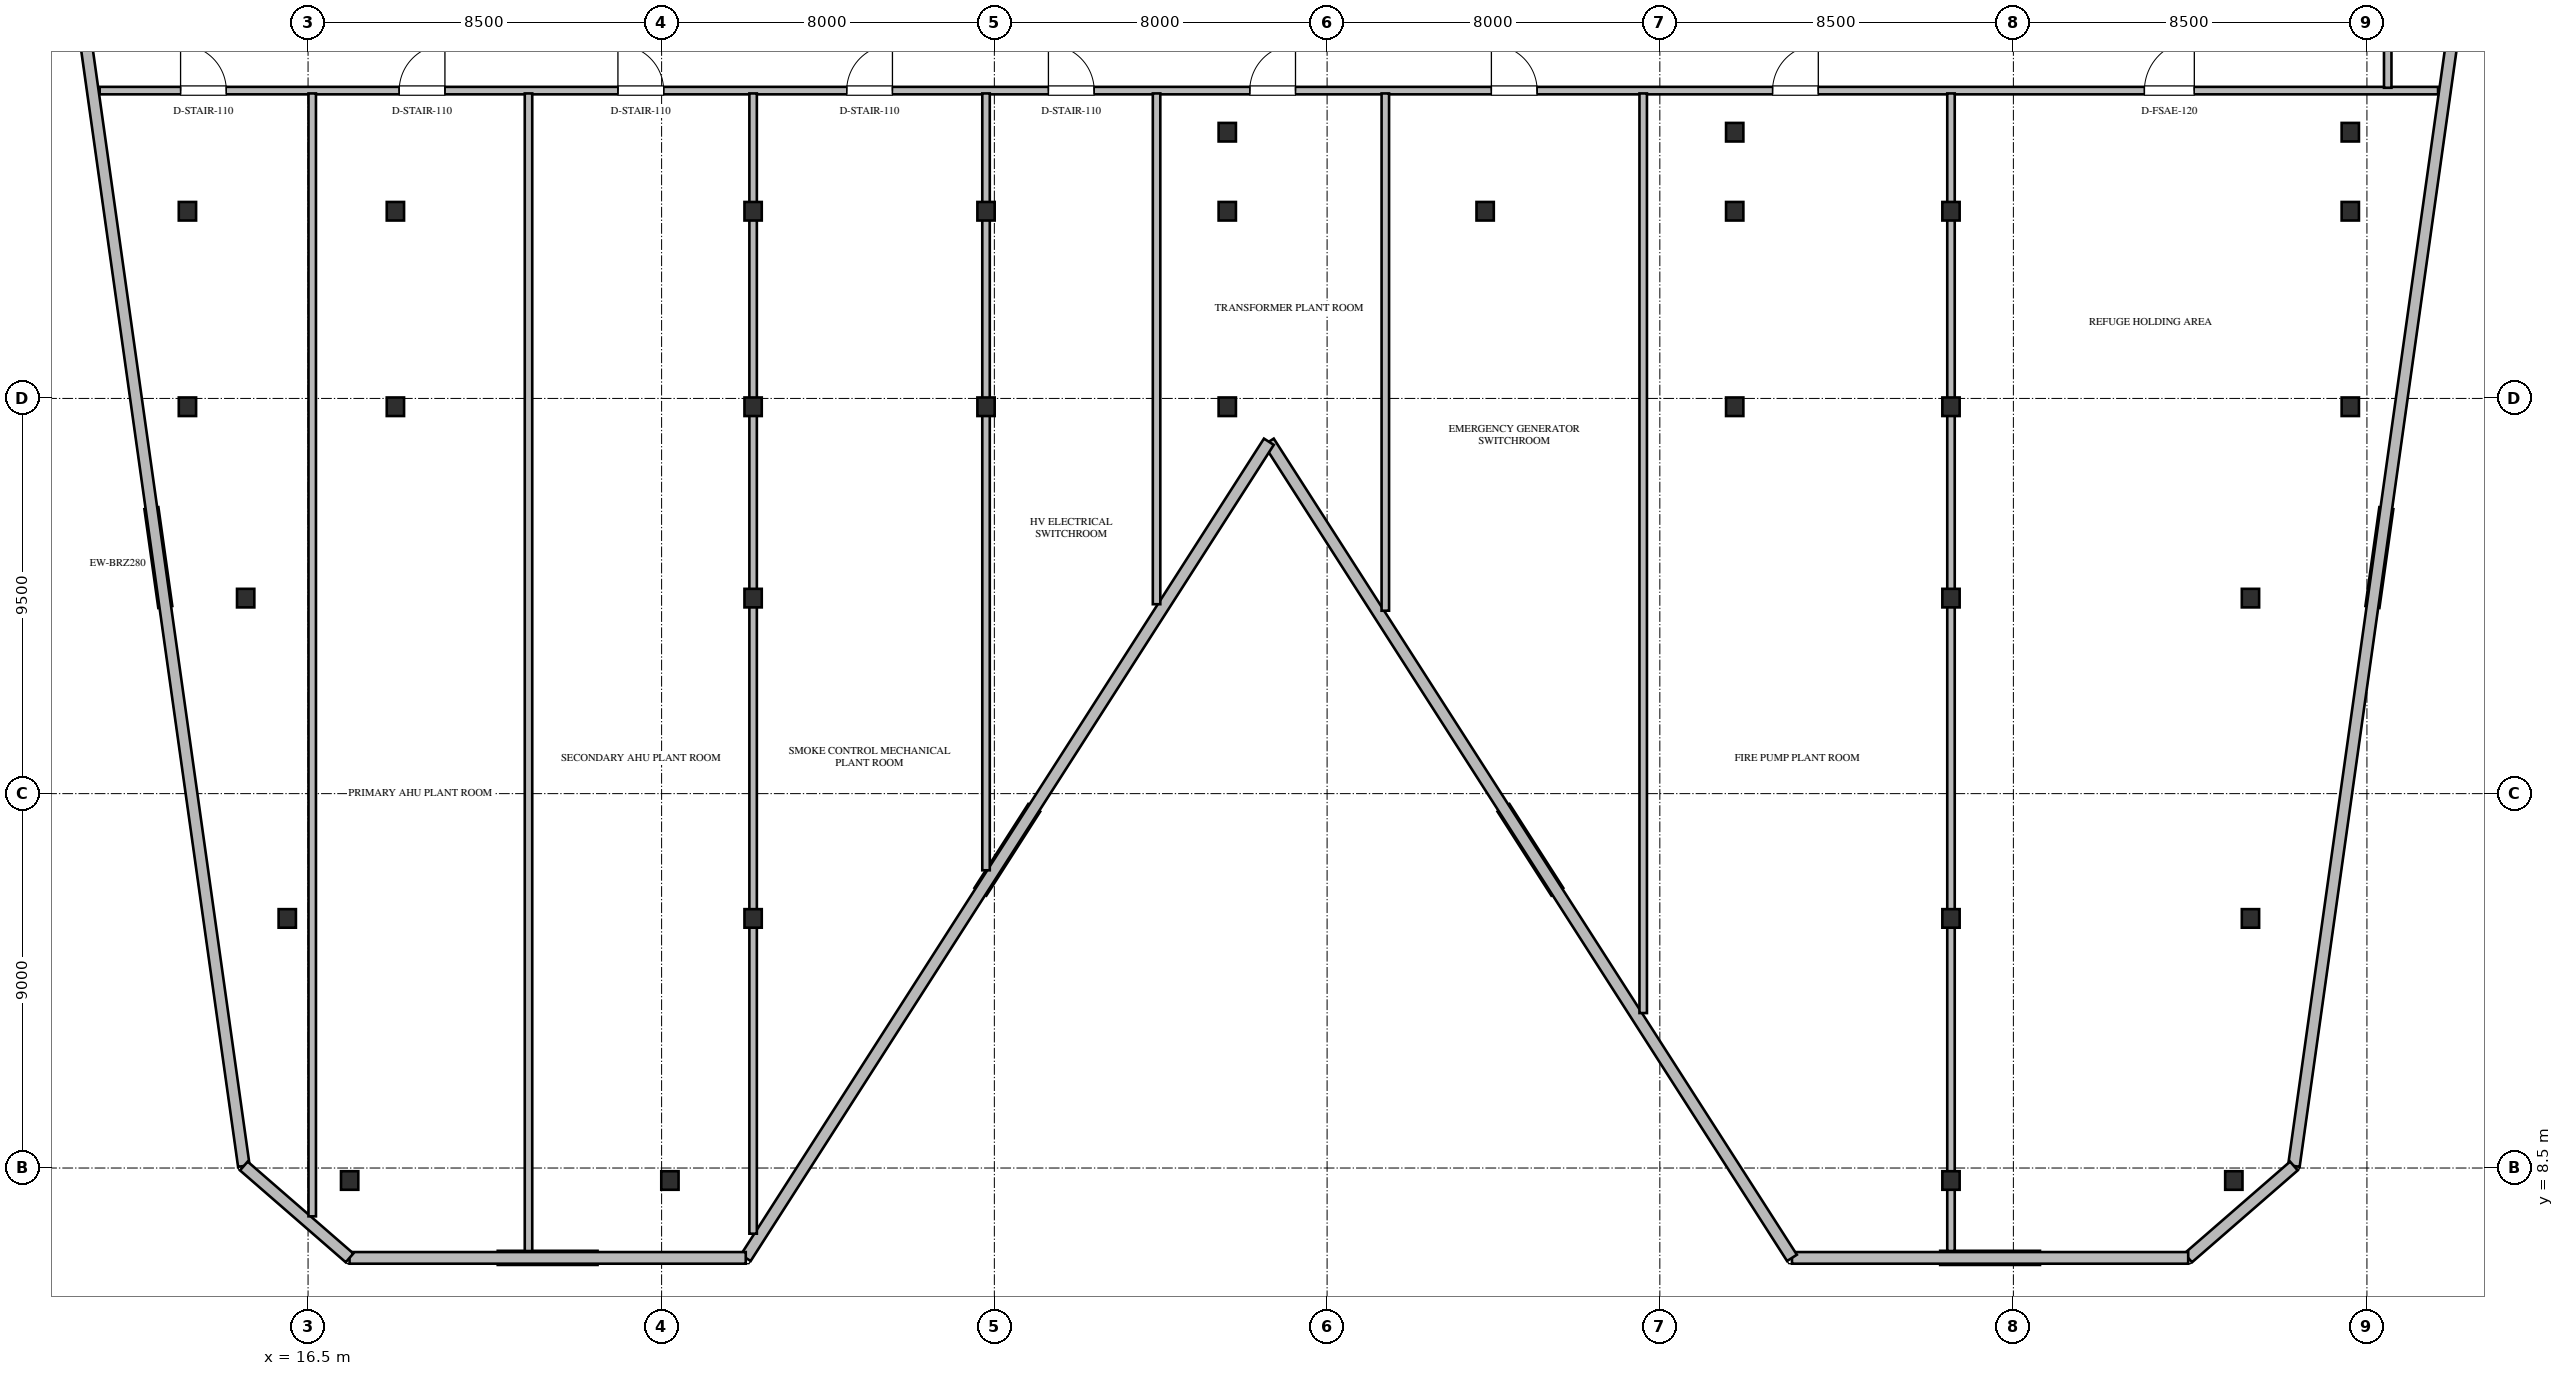
"""IFC4 building model, lengths in metres.
Left out: names, types, materials, properties, quantities, classifications, styles, units other than length and angle.
Written with IfcOpenShell. Run it as: python <this file> out.ifc"""

import sys

from ifc_helpers import new_model, si_unit, direction, frame, frame_2d, origin, origin_2d, place, context, subcontext, project, spatial, rectangle, i_section, extrude, element, fill, save


model = new_model("IFC4")
c1 = context("Model", 3, precision=1e-05, world=origin(), true_north=direction((0.0, 1.0)))
c2 = subcontext(c1, "Body", "Model", "MODEL_VIEW")
j1 = project(units=[si_unit("LENGTHUNIT", "METRE"), si_unit("PLANEANGLEUNIT", "RADIAN")], contexts=[c1])
p1 = place(None, origin())
s1 = spatial("IfcSite", under=j1, at=p1, CompositionType="ELEMENT")
p2 = place(p1, origin())
s2 = spatial("IfcBuilding", under=s1, at=p2, CompositionType="ELEMENT")
p3 = place(p2, frame((0.0, 0.0, 156.0)))
s3 = spatial("IfcBuildingStorey", under=s2, at=p3, CompositionType="ELEMENT", Elevation=156.0)
for number, where, z_axis, x_axis in (
    (1, (17.5, 8.2, 0.0), (0.0, 0.0, 1.0), (1.0, 0.0, 0.0)),
    (2, (13.6, 26.8, 0.0), (0.0, 0.0, 1.0), (1.0, 0.0, 0.0)),
    (3, (18.6, 26.8, 0.0), (0.0, 0.0, 1.0), (1.0, 0.0, 0.0)),
    (4, (27.2, 26.8, 0.0), (0.0, 0.0, 1.0), (1.0, 0.0, 0.0)),
    (5, (32.8, 26.8, 0.0), (0.0, 0.0, 1.0), (1.0, 0.0, 0.0)),
    (6, (38.6, 26.8, 0.0), (0.0, 0.0, 1.0), (1.0, 0.0, 0.0)),
    (7, (50.8, 26.8, 0.0), (0.0, 0.0, 1.0), (1.0, 0.0, 0.0)),
    (8, (56.0, 26.8, 0.0), (0.0, 0.0, 1.0), (1.0, 0.0, 0.0)),
    (9, (65.6, 26.8, 0.0), (0.0, 0.0, 1.0), (1.0, 0.0, 0.0)),
    (10, (13.6, 31.5, 0.0), (0.0, 0.0, 1.0), (1.0, 0.0, 0.0)),
    (11, (18.6, 31.5, 0.0), (0.0, 0.0, 1.0), (1.0, 0.0, 0.0)),
    (12, (27.2, 31.5, 0.0), (0.0, 0.0, 1.0), (1.0, 0.0, 0.0)),
    (13, (25.2, 8.2, 0.0), (0.0, 0.0, 1.0), (1.0, 0.0, 0.0)),
    (14, (32.8, 31.5, 0.0), (0.0, 0.0, 1.0), (1.0, 0.0, 0.0)),
    (15, (38.6, 31.5, 0.0), (0.0, 0.0, 1.0), (1.0, 0.0, 0.0)),
    (16, (44.8, 31.5, 0.0), (0.0, 0.0, 1.0), (1.0, 0.0, 0.0)),
    (17, (50.8, 31.5, 0.0), (0.0, 0.0, 1.0), (1.0, 0.0, 0.0)),
    (18, (56.0, 31.5, 0.0), (0.0, 0.0, 1.0), (1.0, 0.0, 0.0)),
    (19, (65.6, 31.5, 0.0), (0.0, 0.0, 1.0), (1.0, 0.0, 0.0)),
    (20, (56.0, 8.2, 0.0), (0.0, 0.0, 1.0), (1.0, 0.0, 0.0)),
    (21, (62.8, 8.2, 0.0), (0.0, 0.0, 1.0), (1.0, 0.0, 0.0)),
    (22, (16.0, 14.5, 0.0), (0.0, 0.0, 1.0), (1.0, 0.0, 0.0)),
    (23, (27.2, 14.5, 0.0), (0.0, 0.0, 1.0), (1.0, 0.0, 0.0)),
    (24, (56.0, 14.5, 0.0), (0.0, 0.0, 1.0), (1.0, 0.0, 0.0)),
    (25, (63.2, 14.5, 0.0), (0.0, 0.0, 1.0), (1.0, 0.0, 0.0)),
    (26, (15.0, 22.2, 0.0), (0.0, 0.0, 1.0), (1.0, 0.0, 0.0)),
    (27, (27.2, 22.2, 0.0), (0.0, 0.0, 1.0), (1.0, 0.0, 0.0)),
    (28, (56.0, 22.2, 0.0), (0.0, 0.0, 1.0), (1.0, 0.0, 0.0)),
    (29, (63.2, 22.2, 0.0), (0.0, 0.0, 1.0), (1.0, 0.0, 0.0)),
    (30, (38.6, 33.4, 0.0), (0.0, 0.0, 1.0), (1.0, 0.0, 0.0)),
    (31, (50.8, 33.4, 0.0), (0.0, 0.0, 1.0), (1.0, 0.0, 0.0)),
    (32, (65.6, 33.4, 0.0), (0.0, 0.0, 1.0), (1.0, 0.0, 0.0)),
):
    element("IfcColumn", number, at=place(p3, frame(where, z_axis=z_axis, x_axis=x_axis)), inside=s3, PredefinedType="COLUMN", context=c2, shape_type="SweptSolid", body=[
        extrude(i_section(OverallWidth=0.416, OverallDepth=0.446, WebThickness=0.039, FlangeThickness=0.063, FilletRadius=0.03, at=origin_2d()), origin(), (0.0, 0.0, 1.0), 4.5),
    ])
p4 = place(p3, frame((14.956, 8.549, 0.0), z_axis=(0.0, 0.0, 1.0), x_axis=(-0.139176188744, 0.990267634777, 0.0)))
e33 = element("IfcWall", 33, at=p4, inside=s3, PredefinedType="STANDARD", context=c2, shape_type="SweptSolid", body=[
    extrude(rectangle(XDim=29.539, YDim=0.28, at=frame_2d((14.77, 0.0))), origin(), (0.0, 0.0, 1.0), 4.25),
])
p5 = place(p3, frame((68.355, 37.8, 0.0), z_axis=(0.0, 0.0, 1.0), x_axis=(-0.139168083715, -0.990268773856, 0.0)))
e34 = element("IfcWall", 34, at=p5, inside=s3, PredefinedType="STANDARD", context=c2, shape_type="SweptSolid", body=[
    extrude(rectangle(XDim=29.539, YDim=0.28, at=frame_2d((14.769, 0.0))), origin(), (0.0, 0.0, 1.0), 4.25),
])
p6 = place(p3, frame((64.244, 8.549, 0.0), z_axis=(0.0, 0.0, 1.0), x_axis=(-0.754728837785, -0.656036875042, 0.0)))
e35 = element("IfcWall", 35, at=p6, inside=s3, PredefinedType="STANDARD", context=c2, shape_type="SweptSolid", body=[
    extrude(rectangle(XDim=3.367, YDim=0.28, at=frame_2d((1.683, 0.0))), origin(), (0.0, 0.0, 1.0), 4.25),
])
p7 = place(p3, frame((61.703, 6.34, 0.0), z_axis=(0.0, 0.0, 1.0), x_axis=(-1.0, 0.0, 0.0)))
e36 = element("IfcWall", 36, at=p7, inside=s3, PredefinedType="STANDARD", context=c2, shape_type="SweptSolid", body=[
    extrude(rectangle(XDim=9.526, YDim=0.28, at=frame_2d((4.763, 0.0))), origin(), (0.0, 0.0, 1.0), 4.25),
])
p8 = place(p3, frame((52.177, 6.34, 0.0), z_axis=(0.0, 0.0, 1.0), x_axis=(-0.539662687725, 0.841881335746, 0.0)))
e37 = element("IfcWall", 37, at=p8, inside=s3, PredefinedType="STANDARD", context=c2, shape_type="SweptSolid", body=[
    extrude(rectangle(XDim=23.304, YDim=0.28, at=frame_2d((11.652, 0.0))), origin(), (0.0, 0.0, 1.0), 4.25),
])
p9 = place(p3, frame((39.6, 25.959, 0.0), z_axis=(0.0, 0.0, 1.0), x_axis=(-0.539670112848, -0.841876576048, 0.0)))
e38 = element("IfcWall", 38, at=p9, inside=s3, PredefinedType="STANDARD", context=c2, shape_type="SweptSolid", body=[
    extrude(rectangle(XDim=23.304, YDim=0.28, at=frame_2d((11.652, 0.0))), origin(), (0.0, 0.0, 1.0), 4.25),
])
p10 = place(p3, frame((27.023, 6.34, 0.0), z_axis=(0.0, 0.0, 1.0), x_axis=(-1.0, 0.0, 0.0)))
e39 = element("IfcWall", 39, at=p10, inside=s3, PredefinedType="STANDARD", context=c2, shape_type="SweptSolid", body=[
    extrude(rectangle(XDim=9.526, YDim=0.28, at=frame_2d((4.763, 0.0))), origin(), (0.0, 0.0, 1.0), 4.25),
])
p11 = place(p3, frame((17.497, 6.34, 0.0), z_axis=(0.0, 0.0, 1.0), x_axis=(-0.754728837785, 0.656036875042, 0.0)))
e40 = element("IfcWall", 40, at=p11, inside=s3, PredefinedType="STANDARD", context=c2, shape_type="SweptSolid", body=[
    extrude(rectangle(XDim=3.367, YDim=0.28, at=frame_2d((1.683, 0.0))), origin(), (0.0, 0.0, 1.0), 4.25),
])
p12 = place(p3, frame((11.49, 34.4, 0.0), z_axis=(0.0, 0.0, 1.0), x_axis=(1.0, 0.0, 0.0)))
e41 = element("IfcWall", 41, at=p12, inside=s3, PredefinedType="STANDARD", context=c2, shape_type="SweptSolid", body=[
    extrude(rectangle(XDim=56.22, YDim=0.18, at=frame_2d((28.11, 0.0))), origin(), (0.0, 0.0, 1.0), 3.394),
])
p13 = place(p12, frame((49.16, 0.0, 0.0)))
e42 = element("IfcOpeningElement", 42, at=p13, cuts=e41, PredefinedType="OPENING", context=c2, shape_type="SweptSolid", body=[
    extrude(rectangle(XDim=1.2, YDim=2.2, at=frame_2d((0.6, 1.1))), frame((0.0, 0.1, 0.0), z_axis=(0.0, -1.0, 0.0), x_axis=(1.0, 0.0, 0.0)), (0.0, 0.0, 1.0), 0.2),
])
p14 = place(p12, frame((1.945, 0.0, 0.0)))
e43 = element("IfcOpeningElement", 43, at=p14, cuts=e41, PredefinedType="OPENING", context=c2, shape_type="SweptSolid", body=[
    extrude(rectangle(XDim=1.1, YDim=2.2, at=frame_2d((0.55, 1.1))), frame((0.0, 0.1, 0.0), z_axis=(0.0, -1.0, 0.0), x_axis=(1.0, 0.0, 0.0)), (0.0, 0.0, 1.0), 0.2),
])
p15 = place(p12, frame((7.201, 0.0, 0.0)))
e44 = element("IfcOpeningElement", 44, at=p15, cuts=e41, PredefinedType="OPENING", context=c2, shape_type="SweptSolid", body=[
    extrude(rectangle(XDim=1.1, YDim=2.2, at=frame_2d((0.55, 1.1))), frame((0.0, 0.1, 0.0), z_axis=(0.0, -1.0, 0.0), x_axis=(1.0, 0.0, 0.0)), (0.0, 0.0, 1.0), 0.2),
])
p16 = place(p12, frame((12.46, 0.0, 0.0)))
e45 = element("IfcOpeningElement", 45, at=p16, cuts=e41, PredefinedType="OPENING", context=c2, shape_type="SweptSolid", body=[
    extrude(rectangle(XDim=1.1, YDim=2.2, at=frame_2d((0.55, 1.1))), frame((0.0, 0.1, 0.0), z_axis=(0.0, -1.0, 0.0), x_axis=(1.0, 0.0, 0.0)), (0.0, 0.0, 1.0), 0.2),
])
p17 = place(p12, frame((17.96, 0.0, 0.0)))
e46 = element("IfcOpeningElement", 46, at=p17, cuts=e41, PredefinedType="OPENING", context=c2, shape_type="SweptSolid", body=[
    extrude(rectangle(XDim=1.1, YDim=2.2, at=frame_2d((0.55, 1.1))), frame((0.0, 0.1, 0.0), z_axis=(0.0, -1.0, 0.0), x_axis=(1.0, 0.0, 0.0)), (0.0, 0.0, 1.0), 0.2),
])
p18 = place(p12, frame((22.81, 0.0, 0.0)))
e47 = element("IfcOpeningElement", 47, at=p18, cuts=e41, PredefinedType="OPENING", context=c2, shape_type="SweptSolid", body=[
    extrude(rectangle(XDim=1.1, YDim=2.2, at=frame_2d((0.55, 1.1))), frame((0.0, 0.1, 0.0), z_axis=(0.0, -1.0, 0.0), x_axis=(1.0, 0.0, 0.0)), (0.0, 0.0, 1.0), 0.2),
])
p19 = place(p12, frame((27.651, 0.0, 0.0)))
e48 = element("IfcOpeningElement", 48, at=p19, cuts=e41, PredefinedType="OPENING", context=c2, shape_type="SweptSolid", body=[
    extrude(rectangle(XDim=1.1, YDim=2.2, at=frame_2d((0.55, 1.1))), frame((0.0, 0.1, 0.0), z_axis=(0.0, -1.0, 0.0), x_axis=(1.0, 0.0, 0.0)), (0.0, 0.0, 1.0), 0.2),
])
p20 = place(p12, frame((33.46, 0.0, 0.0)))
e49 = element("IfcOpeningElement", 49, at=p20, cuts=e41, PredefinedType="OPENING", context=c2, shape_type="SweptSolid", body=[
    extrude(rectangle(XDim=1.1, YDim=2.2, at=frame_2d((0.55, 1.1))), frame((0.0, 0.1, 0.0), z_axis=(0.0, -1.0, 0.0), x_axis=(1.0, 0.0, 0.0)), (0.0, 0.0, 1.0), 0.2),
])
p21 = place(p12, frame((40.22, 0.0, 0.0)))
e50 = element("IfcOpeningElement", 50, at=p21, cuts=e41, PredefinedType="OPENING", context=c2, shape_type="SweptSolid", body=[
    extrude(rectangle(XDim=1.1, YDim=2.2, at=frame_2d((0.55, 1.1))), frame((0.0, 0.1, 0.0), z_axis=(0.0, -1.0, 0.0), x_axis=(1.0, 0.0, 0.0)), (0.0, 0.0, 1.0), 0.2),
])
p22 = place(p3, frame((66.5, 34.468, 0.0), z_axis=(0.0, 0.0, 1.0), x_axis=(0.0, 1.0, 0.0)))
e51 = element("IfcWall", 51, at=p22, inside=s3, PredefinedType="STANDARD", context=c2, shape_type="SweptSolid", body=[
    extrude(rectangle(XDim=3.199, YDim=0.18, at=frame_2d((1.6, 0.0))), origin(), (0.0, 0.0, 1.0), 3.394),
])
p23 = place(p3, frame((56.0, 6.505, 0.0), z_axis=(0.0, 0.0, 1.0), x_axis=(0.0, 1.0, 0.0)))
e52 = element("IfcWall", 52, at=p23, inside=s3, PredefinedType="STANDARD", context=c2, shape_type="SweptSolid", body=[
    extrude(rectangle(XDim=27.827, YDim=0.18, at=frame_2d((13.914, 0.0))), origin(), (0.0, 0.0, 1.0), 3.239),
])
p24 = place(p3, frame((16.6, 7.339, 0.0), z_axis=(0.0, 0.0, 1.0), x_axis=(0.0, 1.0, 0.0)))
e53 = element("IfcWall", 53, at=p24, inside=s3, PredefinedType="STANDARD", context=c2, shape_type="SweptSolid", body=[
    extrude(rectangle(XDim=26.993, YDim=0.18, at=frame_2d((13.497, 0.0))), origin(), (0.0, 0.0, 1.0), 2.45),
])
p25 = place(p3, frame((21.8, 6.505, 0.0), z_axis=(0.0, 0.0, 1.0), x_axis=(0.0, 1.0, 0.0)))
e54 = element("IfcWall", 54, at=p25, inside=s3, PredefinedType="STANDARD", context=c2, shape_type="SweptSolid", body=[
    extrude(rectangle(XDim=27.827, YDim=0.18, at=frame_2d((13.914, 0.0))), origin(), (0.0, 0.0, 1.0), 2.45),
])
p26 = place(p3, frame((27.2, 6.921, 0.0), z_axis=(0.0, 0.0, 1.0), x_axis=(0.0, 1.0, 0.0)))
e55 = element("IfcWall", 55, at=p26, inside=s3, PredefinedType="STANDARD", context=c2, shape_type="SweptSolid", body=[
    extrude(rectangle(XDim=27.411, YDim=0.18, at=frame_2d((13.706, 0.0))), origin(), (0.0, 0.0, 1.0), 2.45),
])
p27 = place(p3, frame((32.8, 15.657, 0.0), z_axis=(0.0, 0.0, 1.0), x_axis=(0.0, 1.0, 0.0)))
e56 = element("IfcWall", 56, at=p27, inside=s3, PredefinedType="STANDARD", context=c2, shape_type="SweptSolid", body=[
    extrude(rectangle(XDim=18.675, YDim=0.18, at=frame_2d((9.337, 0.0))), origin(), (0.0, 0.0, 1.0), 3.209),
])
p28 = place(p3, frame((36.9, 22.053, 0.0), z_axis=(0.0, 0.0, 1.0), x_axis=(0.0, 1.0, 0.0)))
e57 = element("IfcWall", 57, at=p28, inside=s3, PredefinedType="STANDARD", context=c2, shape_type="SweptSolid", body=[
    extrude(rectangle(XDim=12.279, YDim=0.18, at=frame_2d((6.139, 0.0))), origin(), (0.0, 0.0, 1.0), 3.209),
])
p29 = place(p3, frame((42.4, 21.897, 0.0), z_axis=(0.0, 0.0, 1.0), x_axis=(0.0, 1.0, 0.0)))
e58 = element("IfcWall", 58, at=p29, inside=s3, PredefinedType="STANDARD", context=c2, shape_type="SweptSolid", body=[
    extrude(rectangle(XDim=12.435, YDim=0.18, at=frame_2d((6.217, 0.0))), origin(), (0.0, 0.0, 1.0), 3.394),
])
p30 = place(p3, frame((48.6, 12.225, 0.0), z_axis=(0.0, 0.0, 1.0), x_axis=(0.0, 1.0, 0.0)))
e59 = element("IfcWall", 59, at=p30, inside=s3, PredefinedType="STANDARD", context=c2, shape_type="SweptSolid", body=[
    extrude(rectangle(XDim=22.107, YDim=0.18, at=frame_2d((11.053, 0.0))), origin(), (0.0, 0.0, 1.0), 3.239),
])
p31 = place(p13, origin())
e60 = element("IfcDoor", 60, at=p31, inside=s3, OperationType="SINGLE_SWING_RIGHT", PredefinedType="DOOR", context=c2, shape_type="SweptSolid", body=[
    extrude(rectangle(XDim=1.2, YDim=2.2, at=frame_2d((0.6, 1.1))), frame((0.0, 0.025, 0.0), z_axis=(0.0, -1.0, 0.0), x_axis=(1.0, 0.0, 0.0)), (0.0, 0.0, 1.0), 0.05),
])
fill(e42, e60)
p32 = place(p14, origin())
e61 = element("IfcDoor", 61, at=p32, inside=s3, OperationType="SINGLE_SWING_LEFT", PredefinedType="DOOR", context=c2, shape_type="SweptSolid", body=[
    extrude(rectangle(XDim=1.1, YDim=2.2, at=frame_2d((0.55, 1.1))), frame((0.0, 0.025, 0.0), z_axis=(0.0, -1.0, 0.0), x_axis=(1.0, 0.0, 0.0)), (0.0, 0.0, 1.0), 0.05),
])
fill(e43, e61)
p33 = place(p15, origin())
e62 = element("IfcDoor", 62, at=p33, inside=s3, OperationType="SINGLE_SWING_RIGHT", PredefinedType="DOOR", context=c2, shape_type="SweptSolid", body=[
    extrude(rectangle(XDim=1.1, YDim=2.2, at=frame_2d((0.55, 1.1))), frame((0.0, 0.025, 0.0), z_axis=(0.0, -1.0, 0.0), x_axis=(1.0, 0.0, 0.0)), (0.0, 0.0, 1.0), 0.05),
])
fill(e44, e62)
p34 = place(p16, origin())
e63 = element("IfcDoor", 63, at=p34, inside=s3, OperationType="SINGLE_SWING_LEFT", PredefinedType="DOOR", context=c2, shape_type="SweptSolid", body=[
    extrude(rectangle(XDim=1.1, YDim=2.2, at=frame_2d((0.55, 1.1))), frame((0.0, 0.025, 0.0), z_axis=(0.0, -1.0, 0.0), x_axis=(1.0, 0.0, 0.0)), (0.0, 0.0, 1.0), 0.05),
])
fill(e45, e63)
p35 = place(p17, origin())
e64 = element("IfcDoor", 64, at=p35, inside=s3, OperationType="SINGLE_SWING_RIGHT", PredefinedType="DOOR", context=c2, shape_type="SweptSolid", body=[
    extrude(rectangle(XDim=1.1, YDim=2.2, at=frame_2d((0.55, 1.1))), frame((0.0, 0.025, 0.0), z_axis=(0.0, -1.0, 0.0), x_axis=(1.0, 0.0, 0.0)), (0.0, 0.0, 1.0), 0.05),
])
fill(e46, e64)
p36 = place(p18, origin())
e65 = element("IfcDoor", 65, at=p36, inside=s3, OperationType="SINGLE_SWING_LEFT", PredefinedType="DOOR", context=c2, shape_type="SweptSolid", body=[
    extrude(rectangle(XDim=1.1, YDim=2.2, at=frame_2d((0.55, 1.1))), frame((0.0, 0.025, 0.0), z_axis=(0.0, -1.0, 0.0), x_axis=(1.0, 0.0, 0.0)), (0.0, 0.0, 1.0), 0.05),
])
fill(e47, e65)
p37 = place(p19, origin())
e66 = element("IfcDoor", 66, at=p37, inside=s3, OperationType="SINGLE_SWING_RIGHT", PredefinedType="DOOR", context=c2, shape_type="SweptSolid", body=[
    extrude(rectangle(XDim=1.1, YDim=2.2, at=frame_2d((0.55, 1.1))), frame((0.0, 0.025, 0.0), z_axis=(0.0, -1.0, 0.0), x_axis=(1.0, 0.0, 0.0)), (0.0, 0.0, 1.0), 0.05),
])
fill(e48, e66)
p38 = place(p20, origin())
e67 = element("IfcDoor", 67, at=p38, inside=s3, OperationType="SINGLE_SWING_LEFT", PredefinedType="DOOR", context=c2, shape_type="SweptSolid", body=[
    extrude(rectangle(XDim=1.1, YDim=2.2, at=frame_2d((0.55, 1.1))), frame((0.0, 0.025, 0.0), z_axis=(0.0, -1.0, 0.0), x_axis=(1.0, 0.0, 0.0)), (0.0, 0.0, 1.0), 0.05),
])
fill(e49, e67)
p39 = place(p21, origin())
e68 = element("IfcDoor", 68, at=p39, inside=s3, OperationType="SINGLE_SWING_RIGHT", PredefinedType="DOOR", context=c2, shape_type="SweptSolid", body=[
    extrude(rectangle(XDim=1.1, YDim=2.2, at=frame_2d((0.55, 1.1))), frame((0.0, 0.025, 0.0), z_axis=(0.0, -1.0, 0.0), x_axis=(1.0, 0.0, 0.0)), (0.0, 0.0, 1.0), 0.05),
])
fill(e50, e68)
save(model, sys.argv[1])
